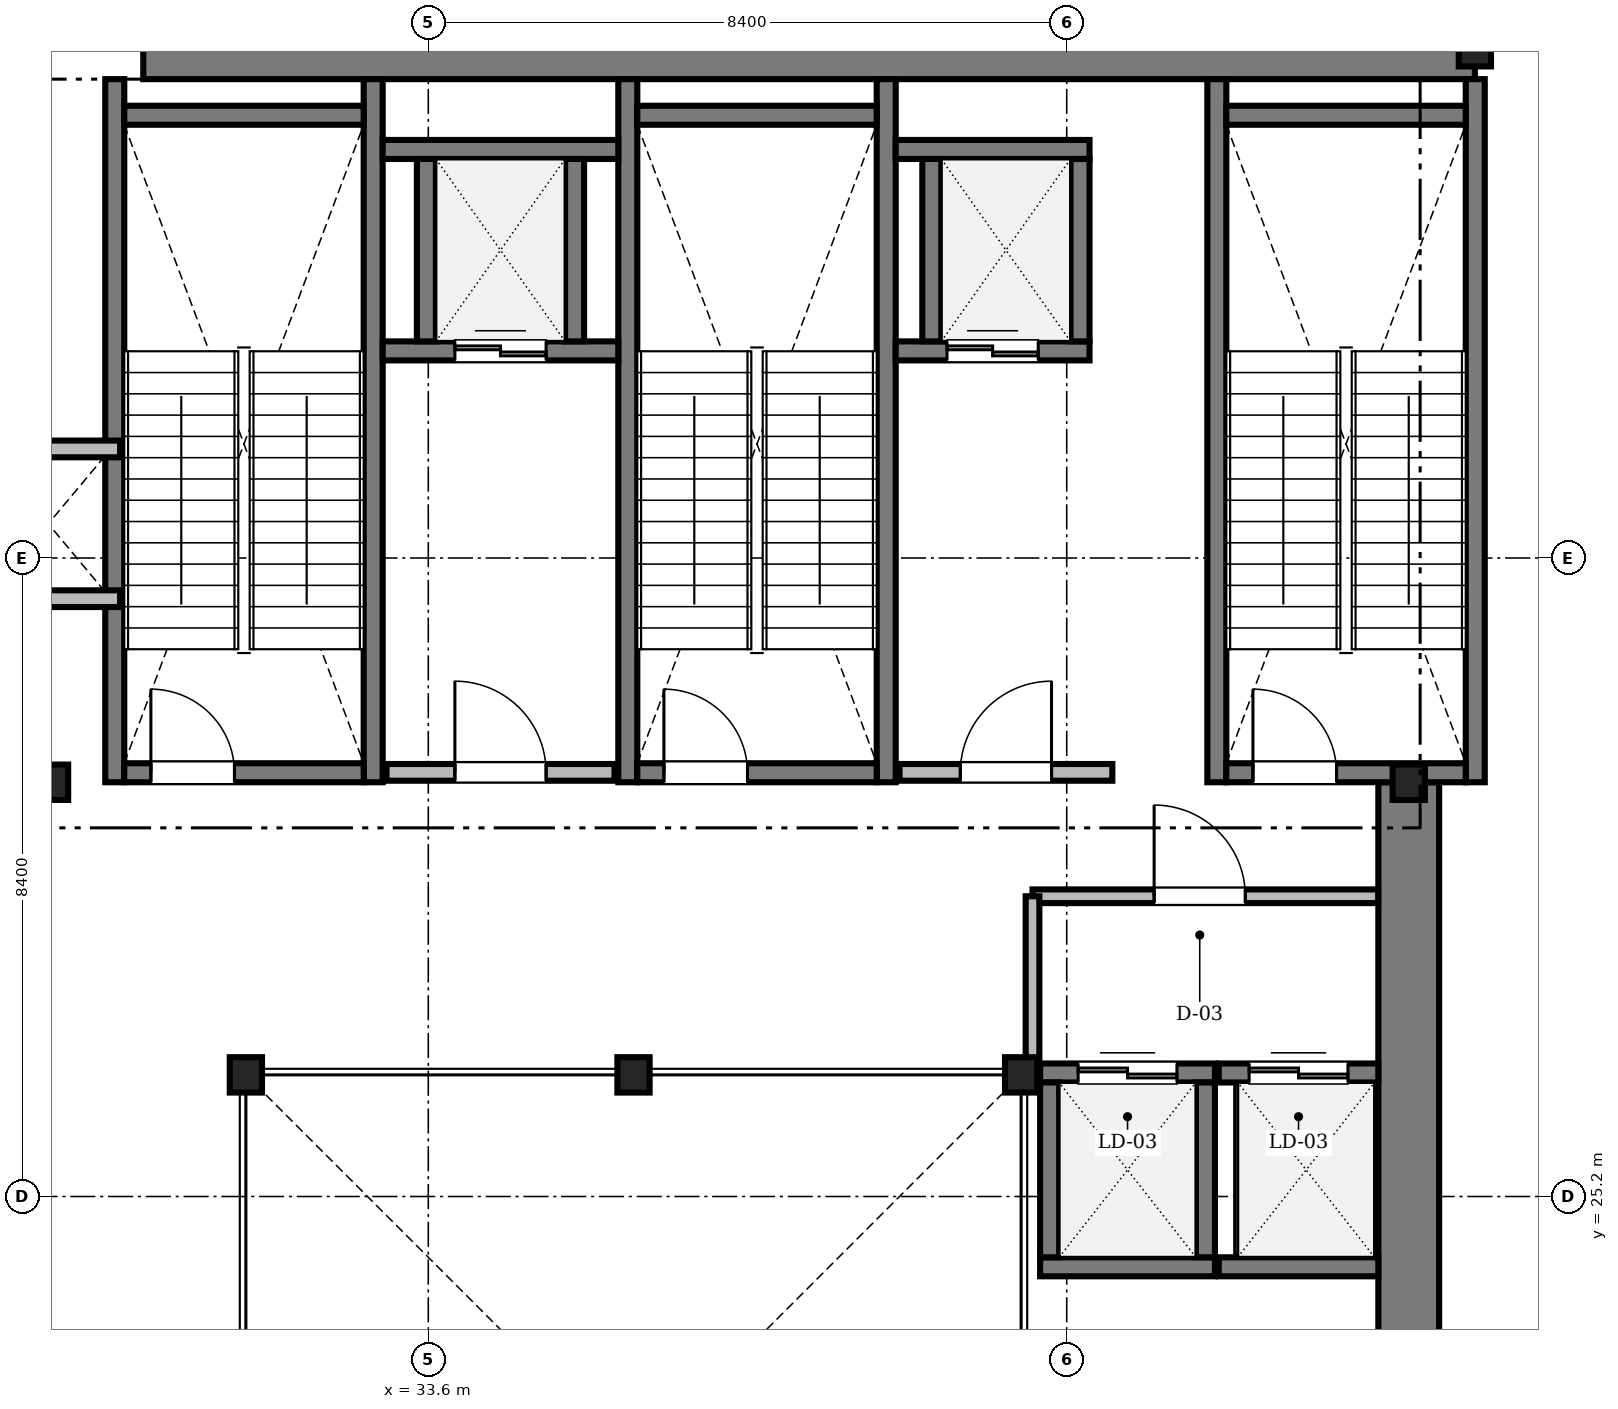
"""IFC4 building model, lengths in metres.
Left out: names, types, materials, properties, quantities, classifications, styles, units other than length and angle.
Written with IfcOpenShell. Run it as: python <this file> out.ifc"""

import sys

from ifc_helpers import new_model, si_unit, direction, frame, frame_2d, origin, origin_2d, place, context, subcontext, project, spatial, rectangle, i_section, extrude, source, transform, mapped, element, fill, save


model = new_model("IFC4")
c1 = context("Model", 3, precision=1e-05, world=origin(), true_north=direction((0.0, 1.0)))
c2 = subcontext(c1, "Body", "Model", "MODEL_VIEW")
j1 = project(units=[si_unit("LENGTHUNIT", "METRE"), si_unit("PLANEANGLEUNIT", "RADIAN")], contexts=[c1])
p1 = place(None, origin())
s1 = spatial("IfcSite", under=j1, at=p1, CompositionType="ELEMENT")
p2 = place(p1, origin())
s2 = spatial("IfcBuilding", under=s1, at=p2, CompositionType="ELEMENT")
p3 = place(p2, frame((0.0, 0.0, 166.8)))
s3 = spatial("IfcBuildingStorey", under=s2, at=p3, CompositionType="ELEMENT", Elevation=166.8)
m1 = source(origin(), c2, "Body", "SweptSolid", [
    extrude(rectangle(XDim=17.52, YDim=0.8, at=frame_2d((8.76, 0.0))), origin(), (0.0, 0.0, 1.0), 4.75),
])
p4 = place(p3, frame((29.85, 40.3, 0.0), z_axis=(0.0, 0.0, 1.0), x_axis=(1.0, 0.0, 0.0)))
e1 = element("IfcWall", 1, at=p4, inside=s3, PredefinedType="SHEAR", context=c2, shape_type="MappedRepresentation", body=[
    mapped(m1, transform((0.0, 0.0, 0.0), scale=1.0)),
])
m2 = source(origin(), c2, "Body", "SweptSolid", [
    extrude(rectangle(XDim=13.15, YDim=0.8, at=frame_2d((6.575, 0.0))), origin(), (0.0, 0.0, 1.0), 4.75),
])
p5 = place(p3, frame((46.5, 17.5, 0.0), z_axis=(0.0, 0.0, 1.0), x_axis=(0.0, 1.0, 0.0)))
e2 = element("IfcWall", 2, at=p5, inside=s3, PredefinedType="SHEAR", context=c2, shape_type="MappedRepresentation", body=[
    mapped(m2, transform((0.0, 0.0, 0.0), scale=1.0)),
])
m3 = source(origin(), c2, "Body", "SweptSolid", [
    extrude(i_section(OverallWidth=0.424, OverallDepth=0.465, WebThickness=0.035, FlangeThickness=0.056, FilletRadius=0.015, at=origin_2d()), origin(), (0.0, 0.0, 1.0), 4.75),
])
for number, where, z_axis, x_axis in (
    (3, (41.4, 26.8, 0.0), (0.0, 0.0, 1.0), (1.0, 0.0, 0.0)),
    (4, (36.3, 26.8, 0.0), (0.0, 0.0, 1.0), (1.0, 0.0, 0.0)),
    (5, (31.2, 26.8, 0.0), (0.0, 0.0, 1.0), (1.0, 0.0, 0.0)),
    (6, (28.65, 30.65, 0.0), (0.0, 0.0, 1.0), (1.0, 0.0, 0.0)),
    (7, (46.5, 30.65, 0.0), (0.0, 0.0, 1.0), (1.0, 0.0, 0.0)),
    (8, (47.37, 40.3, 0.0), (0.0, 0.0, 1.0), (1.0, 0.0, 0.0)),
):
    element("IfcColumn", number, at=place(p3, frame(where, z_axis=z_axis, x_axis=x_axis)), inside=s3, PredefinedType="COLUMN", context=c2, shape_type="MappedRepresentation", body=[
        mapped(m3, transform((0.0, 0.0, 0.0), scale=1.0)),
    ])
m4 = source(origin(), c2, "Body", "SweptSolid", [
    extrude(rectangle(XDim=9.25, YDim=0.25, at=frame_2d((4.625, 0.0))), origin(), (0.0, 0.0, 1.0), 5.2),
])
for number, where, z_axis, x_axis in (
    (9, (29.475, 30.65, 0.0), (0.0, 0.0, 1.0), (0.0, 1.0, 0.0)),
    (10, (32.875, 30.65, 0.0), (0.0, 0.0, 1.0), (0.0, 1.0, 0.0)),
):
    element("IfcWall", number, at=place(p3, frame(where, z_axis=z_axis, x_axis=x_axis)), inside=s3, PredefinedType="SOLIDWALL", context=c2, shape_type="MappedRepresentation", body=[
        mapped(m4, transform((0.0, 0.0, 0.0), scale=1.0)),
    ])
m5 = source(origin(), c2, "Body", "SweptSolid", [
    extrude(rectangle(XDim=3.15, YDim=0.25, at=frame_2d((1.575, 0.0))), origin(), (0.0, 0.0, 1.0), 5.2),
])
p6 = place(p3, frame((29.6, 39.425, 0.0), z_axis=(0.0, 0.0, 1.0), x_axis=(1.0, 0.0, 0.0)))
e11 = element("IfcWall", 11, at=p6, inside=s3, PredefinedType="SOLIDWALL", context=c2, shape_type="MappedRepresentation", body=[
    mapped(m5, transform((0.0, 0.0, 0.0), scale=1.0)),
])
p7 = place(p3, frame((29.6, 30.775, 0.0), z_axis=(0.0, 0.0, 1.0), x_axis=(1.0, 0.0, 0.0)))
e12 = element("IfcWall", 12, at=p7, inside=s3, PredefinedType="SOLIDWALL", context=c2, shape_type="MappedRepresentation", body=[
    mapped(m5, transform((0.0, 0.0, 0.0), scale=1.0)),
])
m6 = source(origin(), c2, "Body", "SweptSolid", [
    extrude(rectangle(XDim=1.1, YDim=2.2, at=frame_2d((0.55, 1.1))), frame((0.0, 0.135, 0.0), z_axis=(0.0, -1.0, 0.0), x_axis=(1.0, 0.0, 0.0)), (0.0, 0.0, 1.0), 0.27),
])
p8 = place(p7, frame((0.35, 0.0, 0.0)))
e13 = element("IfcOpeningElement", 13, at=p8, cuts=e12, PredefinedType="OPENING", context=c2, shape_type="MappedRepresentation", body=[
    mapped(m6, transform((0.0, 0.0, 0.0), scale=1.0)),
])
for number, where, z_axis, x_axis in (
    (14, (36.225, 30.65, 0.0), (0.0, 0.0, 1.0), (0.0, 1.0, 0.0)),
    (15, (39.625, 30.65, 0.0), (0.0, 0.0, 1.0), (0.0, 1.0, 0.0)),
):
    element("IfcWall", number, at=place(p3, frame(where, z_axis=z_axis, x_axis=x_axis)), inside=s3, PredefinedType="SOLIDWALL", context=c2, shape_type="MappedRepresentation", body=[
        mapped(m4, transform((0.0, 0.0, 0.0), scale=1.0)),
    ])
p9 = place(p3, frame((36.35, 39.425, 0.0), z_axis=(0.0, 0.0, 1.0), x_axis=(1.0, 0.0, 0.0)))
e16 = element("IfcWall", 16, at=p9, inside=s3, PredefinedType="SOLIDWALL", context=c2, shape_type="MappedRepresentation", body=[
    mapped(m5, transform((0.0, 0.0, 0.0), scale=1.0)),
])
p10 = place(p3, frame((36.35, 30.775, 0.0), z_axis=(0.0, 0.0, 1.0), x_axis=(1.0, 0.0, 0.0)))
e17 = element("IfcWall", 17, at=p10, inside=s3, PredefinedType="SOLIDWALL", context=c2, shape_type="MappedRepresentation", body=[
    mapped(m5, transform((0.0, 0.0, 0.0), scale=1.0)),
])
p11 = place(p10, frame((0.35, 0.0, 0.0)))
e18 = element("IfcOpeningElement", 18, at=p11, cuts=e17, PredefinedType="OPENING", context=c2, shape_type="MappedRepresentation", body=[
    mapped(m6, transform((0.0, 0.0, 0.0), scale=1.0)),
])
for number, where, z_axis, x_axis in (
    (19, (43.975, 30.65, 0.0), (0.0, 0.0, 1.0), (0.0, 1.0, 0.0)),
    (20, (47.375, 30.65, 0.0), (0.0, 0.0, 1.0), (0.0, 1.0, 0.0)),
):
    element("IfcWall", number, at=place(p3, frame(where, z_axis=z_axis, x_axis=x_axis)), inside=s3, PredefinedType="SOLIDWALL", context=c2, shape_type="MappedRepresentation", body=[
        mapped(m4, transform((0.0, 0.0, 0.0), scale=1.0)),
    ])
p12 = place(p3, frame((44.1, 39.425, 0.0), z_axis=(0.0, 0.0, 1.0), x_axis=(1.0, 0.0, 0.0)))
e21 = element("IfcWall", 21, at=p12, inside=s3, PredefinedType="SOLIDWALL", context=c2, shape_type="MappedRepresentation", body=[
    mapped(m5, transform((0.0, 0.0, 0.0), scale=1.0)),
])
p13 = place(p3, frame((44.1, 30.775, 0.0), z_axis=(0.0, 0.0, 1.0), x_axis=(1.0, 0.0, 0.0)))
e22 = element("IfcWall", 22, at=p13, inside=s3, PredefinedType="SOLIDWALL", context=c2, shape_type="MappedRepresentation", body=[
    mapped(m5, transform((0.0, 0.0, 0.0), scale=1.0)),
])
p14 = place(p13, frame((0.35, 0.0, 0.0)))
e23 = element("IfcOpeningElement", 23, at=p14, cuts=e22, PredefinedType="OPENING", context=c2, shape_type="MappedRepresentation", body=[
    mapped(m6, transform((0.0, 0.0, 0.0), scale=1.0)),
])
m7 = source(origin(), c2, "Body", "SweptSolid", [
    extrude(rectangle(XDim=3.0, YDim=0.22, at=frame_2d((1.5, 0.0))), origin(), (0.0, 0.0, 1.0), 4.75),
])
p15 = place(p3, frame((33.05, 30.78, 0.0), z_axis=(0.0, 0.0, 1.0), x_axis=(1.0, 0.0, 0.0)))
e24 = element("IfcWall", 24, at=p15, inside=s3, PredefinedType="SOLIDWALL", context=c2, shape_type="MappedRepresentation", body=[
    mapped(m7, transform((0.0, 0.0, 0.0), scale=1.0)),
])
m8 = source(origin(), c2, "Body", "SweptSolid", [
    extrude(rectangle(XDim=1.2, YDim=2.2, at=frame_2d((0.6, 1.1))), frame((0.0, 0.12, 0.0), z_axis=(0.0, -1.0, 0.0), x_axis=(1.0, 0.0, 0.0)), (0.0, 0.0, 1.0), 0.24),
])
p16 = place(p15, frame((0.9, 0.0, 0.0)))
e25 = element("IfcOpeningElement", 25, at=p16, cuts=e24, PredefinedType="OPENING", context=c2, shape_type="MappedRepresentation", body=[
    mapped(m8, transform((0.0, 0.0, 0.0), scale=1.0)),
])
m9 = source(origin(), c2, "Body", "SweptSolid", [
    extrude(rectangle(XDim=2.8, YDim=0.22, at=frame_2d((1.4, 0.0))), origin(), (0.0, 0.0, 1.0), 4.75),
])
p17 = place(p3, frame((39.8, 30.78, 0.0), z_axis=(0.0, 0.0, 1.0), x_axis=(1.0, 0.0, 0.0)))
e26 = element("IfcWall", 26, at=p17, inside=s3, PredefinedType="SOLIDWALL", context=c2, shape_type="MappedRepresentation", body=[
    mapped(m9, transform((0.0, 0.0, 0.0), scale=1.0)),
])
p18 = place(p17, frame((0.8, 0.0, 0.0)))
e27 = element("IfcOpeningElement", 27, at=p18, cuts=e26, PredefinedType="OPENING", context=c2, shape_type="MappedRepresentation", body=[
    mapped(m8, transform((0.0, 0.0, 0.0), scale=1.0)),
])
m10 = source(origin(), c2, "Body", "SweptSolid", [
    extrude(rectangle(XDim=1.89, YDim=0.22, at=frame_2d((0.945, 0.0))), origin(), (0.0, 0.0, 1.0), 4.75),
])
for number, where, z_axis, x_axis in (
    (28, (27.655, 33.065, 0.0), (0.0, 0.0, 1.0), (1.0, 0.0, 0.0)),
    (29, (27.655, 35.035, 0.0), (0.0, 0.0, 1.0), (1.0, 0.0, 0.0)),
):
    element("IfcWall", number, at=place(p3, frame(where, z_axis=z_axis, x_axis=x_axis)), inside=s3, PredefinedType="SOLIDWALL", context=c2, shape_type="MappedRepresentation", body=[
        mapped(m10, transform((0.0, 0.0, 0.0), scale=1.0)),
    ])
m11 = source(origin(), c2, "Body", "SweptSolid", [
    extrude(rectangle(XDim=3.1, YDim=0.25, at=frame_2d((1.55, 0.0))), origin(), (0.0, 0.0, 1.0), 4.75),
])
p19 = place(p3, frame((33.0, 36.325, 0.0), z_axis=(0.0, 0.0, 1.0), x_axis=(1.0, 0.0, 0.0)))
e30 = element("IfcWall", 30, at=p19, inside=s3, PredefinedType="SOLIDWALL", context=c2, shape_type="MappedRepresentation", body=[
    mapped(m11, transform((0.0, 0.0, 0.0), scale=1.0)),
])
m12 = source(origin(), c2, "Body", "SweptSolid", [
    extrude(rectangle(XDim=1.2, YDim=2.25, at=frame_2d((0.6, 1.125))), frame((0.0, 0.135, 0.0), z_axis=(0.0, -1.0, 0.0), x_axis=(1.0, 0.0, 0.0)), (0.0, 0.0, 1.0), 0.27),
])
p20 = place(p19, frame((0.95, 0.0, 0.0)))
e31 = element("IfcOpeningElement", 31, at=p20, cuts=e30, PredefinedType="OPENING", context=c2, shape_type="MappedRepresentation", body=[
    mapped(m12, transform((0.0, 0.0, 0.0), scale=1.0)),
])
p21 = place(p3, frame((33.0, 38.975, 0.0), z_axis=(0.0, 0.0, 1.0), x_axis=(1.0, 0.0, 0.0)))
e32 = element("IfcWall", 32, at=p21, inside=s3, PredefinedType="SOLIDWALL", context=c2, shape_type="MappedRepresentation", body=[
    mapped(m11, transform((0.0, 0.0, 0.0), scale=1.0)),
])
m13 = source(origin(), c2, "Body", "SweptSolid", [
    extrude(rectangle(XDim=2.4, YDim=0.25, at=frame_2d((1.2, 0.0))), origin(), (0.0, 0.0, 1.0), 4.75),
])
for number, where, z_axis, x_axis in (
    (33, (33.575, 36.45, 0.0), (0.0, 0.0, 1.0), (0.0, 1.0, 0.0)),
    (34, (35.525, 36.45, 0.0), (0.0, 0.0, 1.0), (0.0, 1.0, 0.0)),
):
    element("IfcWall", number, at=place(p3, frame(where, z_axis=z_axis, x_axis=x_axis)), inside=s3, PredefinedType="SOLIDWALL", context=c2, shape_type="MappedRepresentation", body=[
        mapped(m13, transform((0.0, 0.0, 0.0), scale=1.0)),
    ])
m14 = source(origin(), c2, "Body", "SweptSolid", [
    extrude(rectangle(XDim=2.55, YDim=0.25, at=frame_2d((1.275, 0.0))), origin(), (0.0, 0.0, 1.0), 4.75),
])
p22 = place(p3, frame((39.75, 36.325, 0.0), z_axis=(0.0, 0.0, 1.0), x_axis=(1.0, 0.0, 0.0)))
e35 = element("IfcWall", 35, at=p22, inside=s3, PredefinedType="SOLIDWALL", context=c2, shape_type="MappedRepresentation", body=[
    mapped(m14, transform((0.0, 0.0, 0.0), scale=1.0)),
])
p23 = place(p22, frame((0.675, 0.0, 0.0)))
e36 = element("IfcOpeningElement", 36, at=p23, cuts=e35, PredefinedType="OPENING", context=c2, shape_type="MappedRepresentation", body=[
    mapped(m12, transform((0.0, 0.0, 0.0), scale=1.0)),
])
p24 = place(p3, frame((39.75, 38.975, 0.0), z_axis=(0.0, 0.0, 1.0), x_axis=(1.0, 0.0, 0.0)))
e37 = element("IfcWall", 37, at=p24, inside=s3, PredefinedType="SOLIDWALL", context=c2, shape_type="MappedRepresentation", body=[
    mapped(m14, transform((0.0, 0.0, 0.0), scale=1.0)),
])
for number, where, z_axis, x_axis in (
    (38, (40.225, 36.45, 0.0), (0.0, 0.0, 1.0), (0.0, 1.0, 0.0)),
    (39, (42.175, 36.45, 0.0), (0.0, 0.0, 1.0), (0.0, 1.0, 0.0)),
):
    element("IfcWall", number, at=place(p3, frame(where, z_axis=z_axis, x_axis=x_axis)), inside=s3, PredefinedType="SOLIDWALL", context=c2, shape_type="MappedRepresentation", body=[
        mapped(m13, transform((0.0, 0.0, 0.0), scale=1.0)),
    ])
m15 = source(origin(), c2, "Body", "SweptSolid", [
    extrude(rectangle(XDim=2.3, YDim=0.25, at=frame_2d((1.15, 0.0))), origin(), (0.0, 0.0, 1.0), 4.75),
])
p25 = place(p3, frame((41.65, 24.275, 0.0), z_axis=(0.0, 0.0, 1.0), x_axis=(1.0, 0.0, 0.0)))
e40 = element("IfcWall", 40, at=p25, inside=s3, PredefinedType="SOLIDWALL", context=c2, shape_type="MappedRepresentation", body=[
    mapped(m15, transform((0.0, 0.0, 0.0), scale=1.0)),
])
p26 = place(p3, frame((41.65, 26.825, 0.0), z_axis=(0.0, 0.0, 1.0), x_axis=(1.0, 0.0, 0.0)))
e41 = element("IfcWall", 41, at=p26, inside=s3, PredefinedType="SOLIDWALL", context=c2, shape_type="MappedRepresentation", body=[
    mapped(m15, transform((0.0, 0.0, 0.0), scale=1.0)),
])
m16 = source(origin(), c2, "Body", "SweptSolid", [
    extrude(rectangle(XDim=1.3, YDim=2.3, at=frame_2d((0.65, 1.15))), frame((0.0, 0.135, 0.0), z_axis=(0.0, -1.0, 0.0), x_axis=(1.0, 0.0, 0.0)), (0.0, 0.0, 1.0), 0.27),
])
p27 = place(p26, frame((0.5, 0.0, 0.0)))
e42 = element("IfcOpeningElement", 42, at=p27, cuts=e41, PredefinedType="OPENING", context=c2, shape_type="MappedRepresentation", body=[
    mapped(m16, transform((0.0, 0.0, 0.0), scale=1.0)),
])
for number, where, z_axis, x_axis in (
    (43, (41.775, 24.4, 0.0), (0.0, 0.0, 1.0), (0.0, 1.0, 0.0)),
    (44, (43.825, 24.4, 0.0), (0.0, 0.0, 1.0), (0.0, 1.0, 0.0)),
):
    element("IfcWall", number, at=place(p3, frame(where, z_axis=z_axis, x_axis=x_axis)), inside=s3, PredefinedType="SOLIDWALL", context=c2, shape_type="MappedRepresentation", body=[
        mapped(m15, transform((0.0, 0.0, 0.0), scale=1.0)),
    ])
m17 = source(origin(), c2, "Body", "SweptSolid", [
    extrude(rectangle(XDim=2.1, YDim=0.25, at=frame_2d((1.05, 0.0))), origin(), (0.0, 0.0, 1.0), 4.75),
])
p28 = place(p3, frame((44.0, 24.275, 0.0), z_axis=(0.0, 0.0, 1.0), x_axis=(1.0, 0.0, 0.0)))
e45 = element("IfcWall", 45, at=p28, inside=s3, PredefinedType="SOLIDWALL", context=c2, shape_type="MappedRepresentation", body=[
    mapped(m17, transform((0.0, 0.0, 0.0), scale=1.0)),
])
p29 = place(p3, frame((44.0, 26.825, 0.0), z_axis=(0.0, 0.0, 1.0), x_axis=(1.0, 0.0, 0.0)))
e46 = element("IfcWall", 46, at=p29, inside=s3, PredefinedType="SOLIDWALL", context=c2, shape_type="MappedRepresentation", body=[
    mapped(m17, transform((0.0, 0.0, 0.0), scale=1.0)),
])
p30 = place(p29, frame((0.4, 0.0, 0.0)))
e47 = element("IfcOpeningElement", 47, at=p30, cuts=e46, PredefinedType="OPENING", context=c2, shape_type="MappedRepresentation", body=[
    mapped(m16, transform((0.0, 0.0, 0.0), scale=1.0)),
])
m18 = source(origin(), c2, "Body", "SweptSolid", [
    extrude(rectangle(XDim=4.548, YDim=0.18, at=frame_2d((2.274, 0.0))), origin(), (0.0, 0.0, 1.0), 4.382),
])
p31 = place(p3, frame((41.55, 29.15, 0.0), z_axis=(0.0, 0.0, 1.0), x_axis=(1.0, 0.0, 0.0)))
e48 = element("IfcWall", 48, at=p31, inside=s3, PredefinedType="PARTITIONING", context=c2, shape_type="MappedRepresentation", body=[
    mapped(m18, transform((0.0, 0.0, 0.0), scale=1.0)),
])
m19 = source(origin(), c2, "Body", "SweptSolid", [
    extrude(rectangle(XDim=1.2, YDim=2.2, at=frame_2d((0.6, 1.1))), frame((0.0, 0.1, 0.0), z_axis=(0.0, -1.0, 0.0), x_axis=(1.0, 0.0, 0.0)), (0.0, 0.0, 1.0), 0.2),
])
p32 = place(p31, frame((1.6, 0.0, 0.0)))
e49 = element("IfcOpeningElement", 49, at=p32, cuts=e48, PredefinedType="OPENING", context=c2, shape_type="MappedRepresentation", body=[
    mapped(m19, transform((0.0, 0.0, 0.0), scale=1.0)),
])
m20 = source(origin(), c2, "Body", "SweptSolid", [
    extrude(rectangle(XDim=2.35, YDim=0.18, at=frame_2d((1.175, 0.0))), origin(), (0.0, 0.0, 1.0), 4.382),
])
p33 = place(p3, frame((41.55, 26.8, 0.0), z_axis=(0.0, 0.0, 1.0), x_axis=(0.0, 1.0, 0.0)))
e50 = element("IfcWall", 50, at=p33, inside=s3, PredefinedType="PARTITIONING", context=c2, shape_type="MappedRepresentation", body=[
    mapped(m20, transform((0.0, 0.0, 0.0), scale=1.0)),
])
m21 = source(origin(), c2, "Body", "SweptSolid", [
    extrude(rectangle(XDim=1.1, YDim=2.2, at=frame_2d((0.55, 1.1))), frame((0.0, 0.025, 0.0), z_axis=(0.0, -1.0, 0.0), x_axis=(1.0, 0.0, 0.0)), (0.0, 0.0, 1.0), 0.05),
])
p34 = place(p8, origin())
e51 = element("IfcDoor", 51, at=p34, inside=s3, OperationType="SINGLE_SWING_LEFT", PredefinedType="DOOR", context=c2, shape_type="MappedRepresentation", body=[
    mapped(m21, transform((0.0, 0.0, 0.0), scale=1.0)),
])
fill(e13, e51)
p35 = place(p11, origin())
e52 = element("IfcDoor", 52, at=p35, inside=s3, OperationType="SINGLE_SWING_LEFT", PredefinedType="DOOR", context=c2, shape_type="MappedRepresentation", body=[
    mapped(m21, transform((0.0, 0.0, 0.0), scale=1.0)),
])
fill(e18, e52)
p36 = place(p14, origin())
e53 = element("IfcDoor", 53, at=p36, inside=s3, OperationType="SINGLE_SWING_LEFT", PredefinedType="DOOR", context=c2, shape_type="MappedRepresentation", body=[
    mapped(m21, transform((0.0, 0.0, 0.0), scale=1.0)),
])
fill(e23, e53)
m22 = source(origin(), c2, "Body", "SweptSolid", [
    extrude(rectangle(XDim=1.2, YDim=2.2, at=frame_2d((0.6, 1.1))), frame((0.0, 0.025, 0.0), z_axis=(0.0, -1.0, 0.0), x_axis=(1.0, 0.0, 0.0)), (0.0, 0.0, 1.0), 0.05),
])
p37 = place(p16, origin())
e54 = element("IfcDoor", 54, at=p37, inside=s3, OperationType="SINGLE_SWING_LEFT", PredefinedType="DOOR", context=c2, shape_type="MappedRepresentation", body=[
    mapped(m22, transform((0.0, 0.0, 0.0), scale=1.0)),
])
fill(e25, e54)
p38 = place(p18, origin())
e55 = element("IfcDoor", 55, at=p38, inside=s3, OperationType="SINGLE_SWING_RIGHT", PredefinedType="DOOR", context=c2, shape_type="MappedRepresentation", body=[
    mapped(m22, transform((0.0, 0.0, 0.0), scale=1.0)),
])
fill(e27, e55)
m23 = source(origin(), c2, "Body", "SweptSolid", [
    extrude(rectangle(XDim=1.2, YDim=2.25, at=frame_2d((0.6, 1.125))), frame((0.0, 0.025, 0.0), z_axis=(0.0, -1.0, 0.0), x_axis=(1.0, 0.0, 0.0)), (0.0, 0.0, 1.0), 0.05),
])
p39 = place(p20, origin())
e56 = element("IfcDoor", 56, at=p39, inside=s3, OperationType="DOUBLE_DOOR_SLIDING", PredefinedType="DOOR", context=c2, shape_type="MappedRepresentation", body=[
    mapped(m23, transform((0.0, 0.0, 0.0), scale=1.0)),
])
fill(e31, e56)
p40 = place(p23, origin())
e57 = element("IfcDoor", 57, at=p40, inside=s3, OperationType="DOUBLE_DOOR_SLIDING", PredefinedType="DOOR", context=c2, shape_type="MappedRepresentation", body=[
    mapped(m23, transform((0.0, 0.0, 0.0), scale=1.0)),
])
fill(e36, e57)
m24 = source(origin(), c2, "Body", "SweptSolid", [
    extrude(rectangle(XDim=1.3, YDim=2.3, at=frame_2d((0.65, 1.15))), frame((0.0, 0.025, 0.0), z_axis=(0.0, -1.0, 0.0), x_axis=(1.0, 0.0, 0.0)), (0.0, 0.0, 1.0), 0.05),
])
p41 = place(p27, origin())
e58 = element("IfcDoor", 58, at=p41, inside=s3, OperationType="DOUBLE_DOOR_SLIDING", PredefinedType="DOOR", context=c2, shape_type="MappedRepresentation", body=[
    mapped(m24, transform((0.0, 0.0, 0.0), scale=1.0)),
])
fill(e42, e58)
p42 = place(p30, origin())
e59 = element("IfcDoor", 59, at=p42, inside=s3, OperationType="DOUBLE_DOOR_SLIDING", PredefinedType="DOOR", context=c2, shape_type="MappedRepresentation", body=[
    mapped(m24, transform((0.0, 0.0, 0.0), scale=1.0)),
])
fill(e47, e59)
p43 = place(p32, origin())
e60 = element("IfcDoor", 60, at=p43, inside=s3, OperationType="SINGLE_SWING_LEFT", PredefinedType="DOOR", context=c2, shape_type="MappedRepresentation", body=[
    mapped(m22, transform((0.0, 0.0, 0.0), scale=1.0)),
])
fill(e49, e60)
save(model, sys.argv[1])
